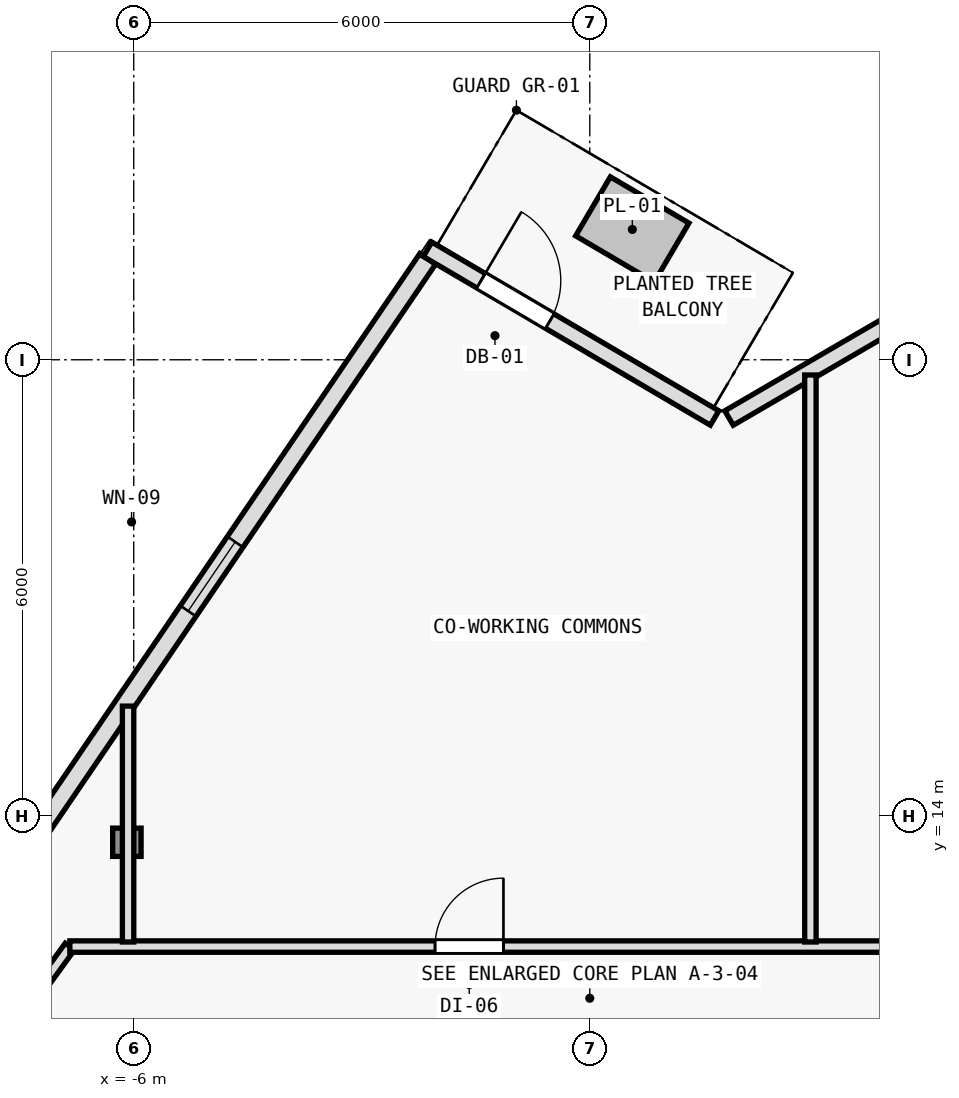
"""IFC4 building model, lengths in metres.
Left out: names, types, materials, properties, quantities, classifications, styles, units other than length and angle.
Written with IfcOpenShell. Run it as: python <this file> out.ifc"""

import sys

from ifc_helpers import new_model, si_unit, direction, frame, frame_2d, origin, origin_2d, place, context, subcontext, project, spatial, rectangle, i_section, extrude, element, fill, save


model = new_model("IFC4")
c1 = context("Model", 3, precision=1e-05, world=origin(), true_north=direction((0.0, 1.0)))
c2 = subcontext(c1, "Body", "Model", "MODEL_VIEW")
j1 = project(units=[si_unit("LENGTHUNIT", "METRE"), si_unit("PLANEANGLEUNIT", "RADIAN")], contexts=[c1])
p1 = place(None, origin())
s1 = spatial("IfcSite", under=j1, at=p1, CompositionType="ELEMENT")
p2 = place(p1, origin())
s2 = spatial("IfcBuilding", under=s1, at=p2, CompositionType="ELEMENT")
p3 = place(p2, frame((0.0, 0.0, 250.8)))
s3 = spatial("IfcBuildingStorey", under=s2, at=p3, CompositionType="ELEMENT", Elevation=250.8)
p4 = place(p3, frame((-6.09, 13.652, 0.005), z_axis=(0.008842562123, -0.00251672922, 0.999957736691), x_axis=(0.273743828055, 0.961802639112, 0.0)))
e1 = element("IfcColumn", 1, at=p4, inside=s3, PredefinedType="COLUMN", context=c2, shape_type="SweptSolid", body=[
    extrude(i_section(OverallWidth=0.374, OverallDepth=0.372, WebThickness=0.012, FlangeThickness=0.02, FilletRadius=0.015, at=origin_2d()), origin(), (0.0, 0.0, 1.0), 3.589),
])
p5 = place(p3, frame((-7.817, 12.971, 0.0), z_axis=(0.0, 0.0, 1.0), x_axis=(0.562474530687, 0.826814611826, 0.0)))
e2 = element("IfcWall", 2, at=p5, inside=s3, PredefinedType="SOLIDWALL", context=c2, shape_type="SweptSolid", body=[
    extrude(rectangle(XDim=10.107, YDim=0.25, at=frame_2d((5.053, 0.0))), origin(), (0.0, 0.0, 1.0), 3.35),
])
p6 = place(p5, frame((4.503, 0.0, 0.62)))
e3 = element("IfcOpeningElement", 3, at=p6, cuts=e2, PredefinedType="OPENING", context=c2, shape_type="SweptSolid", body=[
    extrude(rectangle(XDim=1.1, YDim=1.8, at=frame_2d((0.55, 0.9))), frame((0.0, 0.135, 0.0), z_axis=(0.0, -1.0, 0.0), x_axis=(1.0, 0.0, 0.0)), (0.0, 0.0, 1.0), 0.27),
])
p7 = place(p3, frame((1.832, 19.234, 0.0), z_axis=(0.0, 0.0, 1.0), x_axis=(0.86397765749, 0.503530145432, 0.0)))
e4 = element("IfcWall", 4, at=p7, inside=s3, PredefinedType="SOLIDWALL", context=c2, shape_type="SweptSolid", body=[
    extrude(rectangle(XDim=3.964, YDim=0.22, at=frame_2d((1.982, 0.0))), origin(), (0.0, 0.0, 1.0), 3.35),
])
p8 = place(p3, frame((-2.134, 21.453, 0.0), z_axis=(0.0, 0.0, 1.0), x_axis=(0.862106131527, -0.506727755292, 0.0)))
e5 = element("IfcWall", 5, at=p8, inside=s3, PredefinedType="SOLIDWALL", context=c2, shape_type="SweptSolid", body=[
    extrude(rectangle(XDim=4.38, YDim=0.22, at=frame_2d((2.19, 0.0))), origin(), (0.0, 0.0, 1.0), 3.35),
])
p9 = place(p8, frame((0.815, 0.0, 0.0)))
e6 = element("IfcOpeningElement", 6, at=p9, cuts=e5, PredefinedType="OPENING", context=c2, shape_type="SweptSolid", body=[
    extrude(rectangle(XDim=1.05, YDim=2.15, at=frame_2d((0.525, 1.075))), frame((0.0, 0.12, 0.0), z_axis=(0.0, -1.0, 0.0), x_axis=(1.0, 0.0, 0.0)), (0.0, 0.0, 1.0), 0.24),
])
p10 = place(p3, frame((-9.78, 8.226, 0.0), z_axis=(0.0, 0.0, 1.0), x_axis=(0.586956386413, 0.809618552436, 0.0)))
e7 = element("IfcWall", 7, at=p10, inside=s3, PredefinedType="PARTITIONING", context=c2, shape_type="SweptSolid", body=[
    extrude(rectangle(XDim=5.008, YDim=0.15, at=frame_2d((2.504, 0.0))), origin(), (0.0, 0.0, 1.0), 2.875),
])
p11 = place(p10, frame((1.154, 0.0, 0.0)))
e8 = element("IfcOpeningElement", 8, at=p11, cuts=e7, PredefinedType="OPENING", context=c2, shape_type="SweptSolid", body=[
    extrude(rectangle(XDim=0.9, YDim=2.1, at=frame_2d((0.45, 1.05))), frame((0.0, 0.085, 0.0), z_axis=(0.0, -1.0, 0.0), x_axis=(1.0, 0.0, 0.0)), (0.0, 0.0, 1.0), 0.17),
])
p12 = place(p3, frame((-6.841, 12.28, 0.0), z_axis=(0.0, 0.0, 1.0), x_axis=(1.0, 0.0, 0.0)))
e9 = element("IfcWall", 9, at=p12, inside=s3, PredefinedType="PARTITIONING", context=c2, shape_type="SweptSolid", body=[
    extrude(rectangle(XDim=13.682, YDim=0.15, at=frame_2d((6.841, 0.0))), origin(), (0.0, 0.0, 1.0), 3.015),
])
p13 = place(p12, frame((4.805, 0.0, 0.0)))
e10 = element("IfcOpeningElement", 10, at=p13, cuts=e9, PredefinedType="OPENING", context=c2, shape_type="SweptSolid", body=[
    extrude(rectangle(XDim=0.9, YDim=2.1, at=frame_2d((0.45, 1.05))), frame((0.0, 0.085, 0.0), z_axis=(0.0, -1.0, 0.0), x_axis=(1.0, 0.0, 0.0)), (0.0, 0.0, 1.0), 0.17),
])
p14 = place(p3, frame((-6.074, 12.34, 0.0), z_axis=(0.0, 0.0, 1.0), x_axis=(0.0, 1.0, 0.0)))
e11 = element("IfcWall", 11, at=p14, inside=s3, PredefinedType="PARTITIONING", context=c2, shape_type="SweptSolid", body=[
    extrude(rectangle(XDim=3.103, YDim=0.15, at=frame_2d((1.552, 0.0))), origin(), (0.0, 0.0, 1.0), 3.015),
])
p15 = place(p3, frame((2.903, 12.34, 0.0), z_axis=(0.0, 0.0, 1.0), x_axis=(0.0, 1.0, 0.0)))
e12 = element("IfcWall", 12, at=p15, inside=s3, PredefinedType="PARTITIONING", context=c2, shape_type="SweptSolid", body=[
    extrude(rectangle(XDim=7.46, YDim=0.15, at=frame_2d((3.73, 0.0))), origin(), (0.0, 0.0, 1.0), 3.015),
])
p16 = place(p6, origin())
e13 = element("IfcWindow", 13, at=p16, inside=s3, PartitioningType="SINGLE_PANEL", PredefinedType="WINDOW", context=c2, shape_type="SweptSolid", body=[
    extrude(rectangle(XDim=1.1, YDim=1.8, at=frame_2d((0.55, 0.9))), frame((0.0, 0.03, 0.0), z_axis=(0.0, -1.0, 0.0), x_axis=(1.0, 0.0, 0.0)), (0.0, 0.0, 1.0), 0.06),
])
fill(e3, e13)
p17 = place(p9, origin())
e14 = element("IfcDoor", 14, at=p17, inside=s3, OperationType="SINGLE_SWING_LEFT", PredefinedType="DOOR", context=c2, shape_type="SweptSolid", body=[
    extrude(rectangle(XDim=1.05, YDim=2.15, at=frame_2d((0.525, 1.075))), frame((0.0, 0.025, 0.0), z_axis=(0.0, -1.0, 0.0), x_axis=(1.0, 0.0, 0.0)), (0.0, 0.0, 1.0), 0.05),
])
fill(e6, e14)
p18 = place(p13, origin())
e15 = element("IfcDoor", 15, at=p18, inside=s3, OperationType="SINGLE_SWING_RIGHT", PredefinedType="DOOR", context=c2, shape_type="SweptSolid", body=[
    extrude(rectangle(XDim=0.9, YDim=2.1, at=frame_2d((0.45, 1.05))), frame((0.0, 0.025, 0.0), z_axis=(0.0, -1.0, 0.0), x_axis=(1.0, 0.0, 0.0)), (0.0, 0.0, 1.0), 0.05),
])
fill(e10, e15)
save(model, sys.argv[1])
